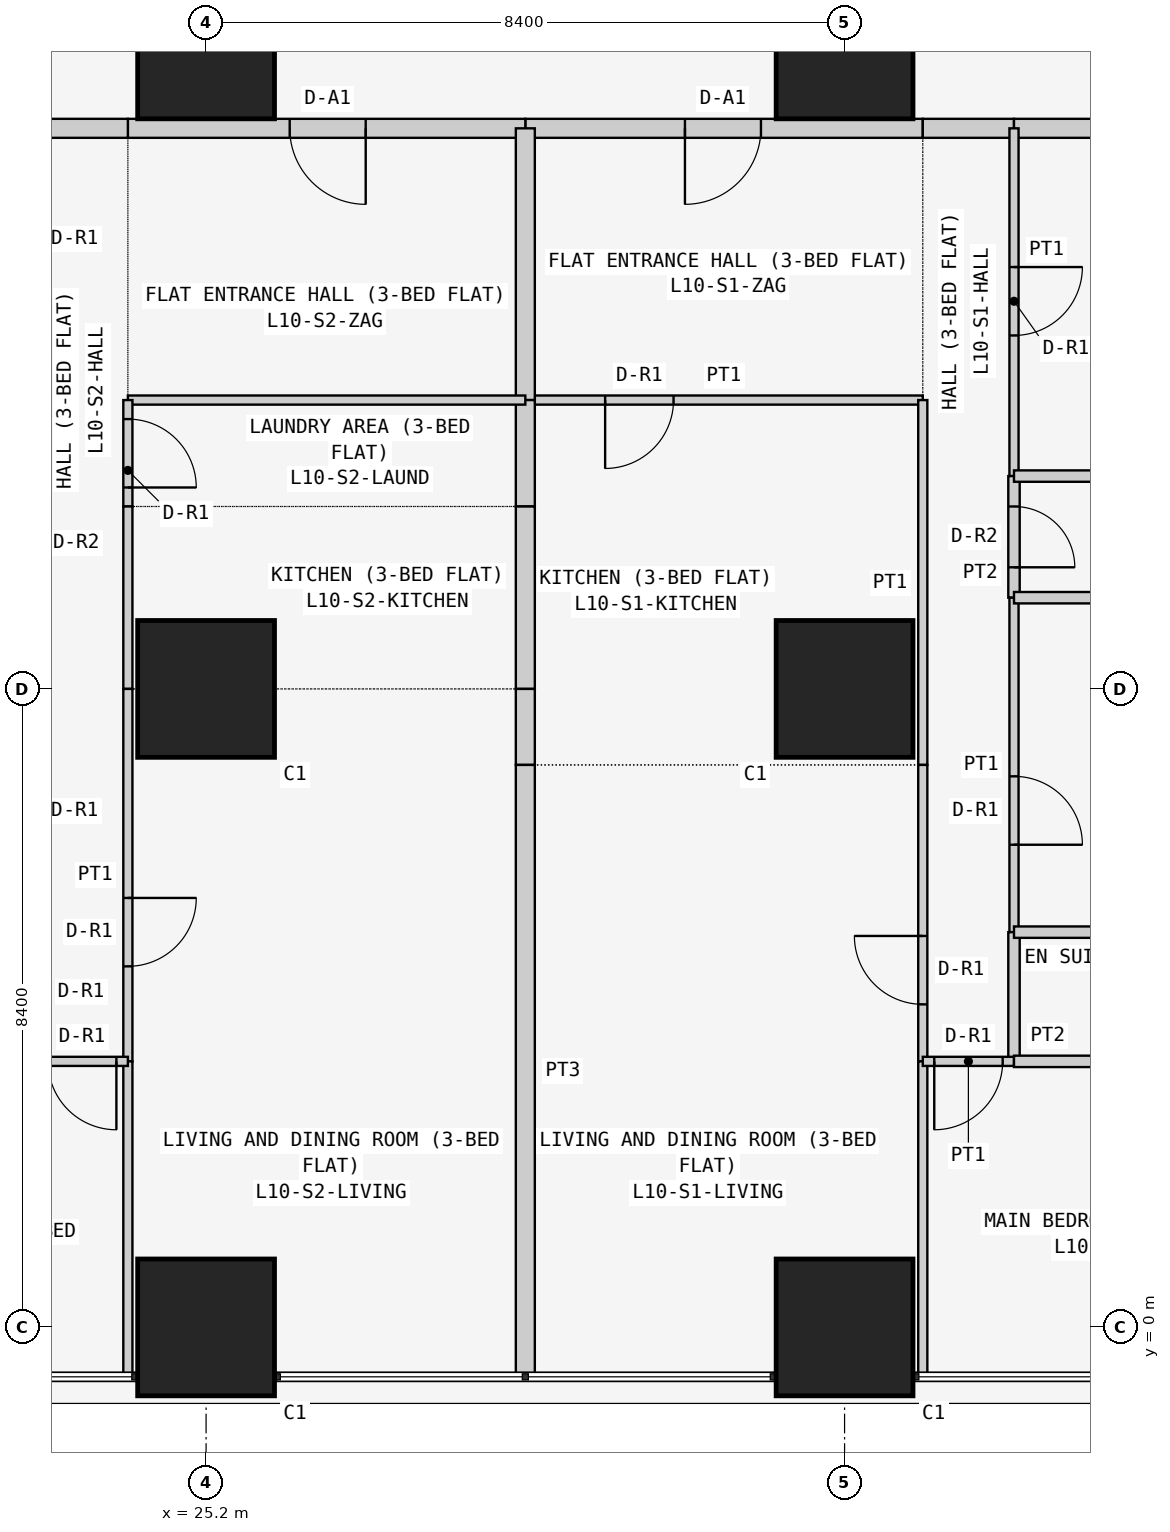
"""IFC4 building model, lengths in metres.
Left out: names, types, materials, properties, quantities, classifications, styles, units other than length and angle.
Written with IfcOpenShell. Run it as: python <this file> out.ifc"""

import sys

from ifc_helpers import new_model, si_unit, direction, frame, frame_2d, origin, origin_2d, place, context, subcontext, project, spatial, rectangle, extrude, element, fill, save


model = new_model("IFC4")
c1 = context("Model", 3, precision=1e-05, world=origin(), true_north=direction((0.0, 1.0)))
c2 = subcontext(c1, "Body", "Model", "MODEL_VIEW")
j1 = project(units=[si_unit("LENGTHUNIT", "METRE"), si_unit("PLANEANGLEUNIT", "RADIAN")], contexts=[c1])
p1 = place(None, origin())
s1 = spatial("IfcSite", under=j1, at=p1, CompositionType="ELEMENT")
p2 = place(p1, origin())
s2 = spatial("IfcBuilding", under=s1, at=p2, CompositionType="ELEMENT")
p3 = place(p2, frame((0.0, 0.0, 45.3)))
s3 = spatial("IfcBuildingStorey", under=s2, at=p3, CompositionType="ELEMENT", Elevation=45.3)
for number, where, z_axis, x_axis in (
    (1, (25.2, 0.0, 0.0), (0.0, 0.0, 1.0), (1.0, 0.0, 0.0)),
    (2, (25.2, 8.4, 0.0), (0.0, 0.0, 1.0), (1.0, 0.0, 0.0)),
    (3, (25.2, 16.8, 0.0), (0.0, 0.0, 1.0), (1.0, 0.0, 0.0)),
    (4, (33.6, 0.0, 0.0), (0.0, 0.0, 1.0), (1.0, 0.0, 0.0)),
    (5, (33.6, 8.4, 0.0), (0.0, 0.0, 1.0), (1.0, 0.0, 0.0)),
    (6, (33.6, 16.8, 0.0), (0.0, 0.0, 1.0), (1.0, 0.0, 0.0)),
):
    element("IfcColumn", number, at=place(p3, frame(where, z_axis=z_axis, x_axis=x_axis)), inside=s3, PredefinedType="COLUMN", context=c2, shape_type="SweptSolid", body=[
        extrude(rectangle(XDim=1.8, YDim=1.8, at=origin_2d()), origin(), (0.0, 0.0, 1.0), 3.6),
    ])
p4 = place(p3, frame((34.629, 15.775, 0.0), z_axis=(0.0, 0.0, 1.0), x_axis=(-1.0, 0.0, 0.0)))
e7 = element("IfcWall", 7, at=p4, inside=s3, PredefinedType="PARTITIONING", context=c2, shape_type="SweptSolid", body=[
    extrude(rectangle(XDim=5.229, YDim=0.25, at=frame_2d((2.615, 0.0))), origin(), (0.0, 0.0, 1.0), 3.45),
])
p5 = place(p4, frame((2.129, 0.0, 0.0)))
e8 = element("IfcOpeningElement", 8, at=p5, cuts=e7, PredefinedType="OPENING", context=c2, shape_type="SweptSolid", body=[
    extrude(rectangle(XDim=1.0, YDim=2.1, at=frame_2d((0.5, 1.05))), frame((0.0, 0.135, 0.0), z_axis=(0.0, -1.0, 0.0), x_axis=(1.0, 0.0, 0.0)), (0.0, 0.0, 1.0), 0.27),
])
p6 = place(p3, frame((35.829, 15.775, 0.0), z_axis=(0.0, 0.0, 1.0), x_axis=(-1.0, 0.0, 0.0)))
e9 = element("IfcWall", 9, at=p6, inside=s3, PredefinedType="PARTITIONING", context=c2, shape_type="SweptSolid", body=[
    extrude(rectangle(XDim=1.2, YDim=0.25, at=frame_2d((0.6, 0.0))), origin(), (0.0, 0.0, 1.0), 3.45),
])
p7 = place(p3, frame((42.7, 15.775, 0.0), z_axis=(0.0, 0.0, 1.0), x_axis=(-1.0, 0.0, 0.0)))
e10 = element("IfcWall", 10, at=p7, inside=s3, PredefinedType="PARTITIONING", context=c2, shape_type="SweptSolid", body=[
    extrude(rectangle(XDim=6.871, YDim=0.25, at=frame_2d((3.436, 0.0))), origin(), (0.0, 0.0, 1.0), 3.45),
])
p8 = place(p3, frame((29.4, 15.775, 0.0), z_axis=(0.0, 0.0, 1.0), x_axis=(-1.0, 0.0, 0.0)))
e11 = element("IfcWall", 11, at=p8, inside=s3, PredefinedType="PARTITIONING", context=c2, shape_type="SweptSolid", body=[
    extrude(rectangle(XDim=5.229, YDim=0.25, at=frame_2d((2.615, 0.0))), origin(), (0.0, 0.0, 1.0), 3.45),
])
p9 = place(p8, frame((2.1, 0.0, 0.0)))
e12 = element("IfcOpeningElement", 12, at=p9, cuts=e11, PredefinedType="OPENING", context=c2, shape_type="SweptSolid", body=[
    extrude(rectangle(XDim=1.0, YDim=2.1, at=frame_2d((0.5, 1.05))), frame((0.0, 0.135, 0.0), z_axis=(0.0, -1.0, 0.0), x_axis=(1.0, 0.0, 0.0)), (0.0, 0.0, 1.0), 0.27),
])
p10 = place(p3, frame((24.171, 15.775, 0.0), z_axis=(0.0, 0.0, 1.0), x_axis=(-1.0, 0.0, 0.0)))
e13 = element("IfcWall", 13, at=p10, inside=s3, PredefinedType="PARTITIONING", context=c2, shape_type="SweptSolid", body=[
    extrude(rectangle(XDim=1.2, YDim=0.25, at=frame_2d((0.6, 0.0))), origin(), (0.0, 0.0, 1.0), 3.45),
])
p11 = place(p3, frame((29.4, 12.2, 0.0), z_axis=(0.0, 0.0, 1.0), x_axis=(1.0, 0.0, 0.0)))
e14 = element("IfcWall", 14, at=p11, inside=s3, PredefinedType="PARTITIONING", context=c2, shape_type="SweptSolid", body=[
    extrude(rectangle(XDim=5.229, YDim=0.12, at=frame_2d((2.615, 0.0))), origin(), (0.0, 0.0, 1.0), 3.45),
])
p12 = place(p11, frame((1.05, 0.0, 0.0)))
e15 = element("IfcOpeningElement", 15, at=p12, cuts=e14, PredefinedType="OPENING", context=c2, shape_type="SweptSolid", body=[
    extrude(rectangle(XDim=0.9, YDim=2.1, at=frame_2d((0.45, 1.05))), frame((0.0, 0.07, 0.0), z_axis=(0.0, -1.0, 0.0), x_axis=(1.0, 0.0, 0.0)), (0.0, 0.0, 1.0), 0.14),
])
p13 = place(p3, frame((29.4, 15.775, 0.0), z_axis=(0.0, 0.0, 1.0), x_axis=(0.0, -1.0, 0.0)))
e16 = element("IfcWall", 16, at=p13, inside=s3, PredefinedType="PARTITIONING", context=c2, shape_type="SweptSolid", body=[
    extrude(rectangle(XDim=3.575, YDim=0.25, at=frame_2d((1.788, 0.0))), origin(), (0.0, 0.0, 1.0), 2.848),
])
p14 = place(p3, frame((34.629, 7.4, 0.0), z_axis=(0.0, 0.0, 1.0), x_axis=(0.0, 1.0, 0.0)))
e17 = element("IfcWall", 17, at=p14, inside=s3, PredefinedType="PARTITIONING", context=c2, shape_type="SweptSolid", body=[
    extrude(rectangle(XDim=4.8, YDim=0.12, at=frame_2d((2.4, 0.0))), origin(), (0.0, 0.0, 1.0), 3.45),
])
p15 = place(p3, frame((29.4, 12.2, 0.0), z_axis=(0.0, 0.0, 1.0), x_axis=(0.0, -1.0, 0.0)))
e18 = element("IfcWall", 18, at=p15, inside=s3, PredefinedType="PARTITIONING", context=c2, shape_type="SweptSolid", body=[
    extrude(rectangle(XDim=1.4, YDim=0.25, at=frame_2d((0.7, 0.0))), origin(), (0.0, 0.0, 1.0), 2.848),
])
p16 = place(p3, frame((29.4, 10.8, 0.0), z_axis=(0.0, 0.0, 1.0), x_axis=(0.0, -1.0, 0.0)))
e19 = element("IfcWall", 19, at=p16, inside=s3, PredefinedType="PARTITIONING", context=c2, shape_type="SweptSolid", body=[
    extrude(rectangle(XDim=2.4, YDim=0.25, at=frame_2d((1.2, 0.0))), origin(), (0.0, 0.0, 1.0), 2.848),
])
p17 = place(p3, frame((29.4, 8.4, 0.0), z_axis=(0.0, 0.0, 1.0), x_axis=(0.0, -1.0, 0.0)))
e20 = element("IfcWall", 20, at=p17, inside=s3, PredefinedType="PARTITIONING", context=c2, shape_type="SweptSolid", body=[
    extrude(rectangle(XDim=1.0, YDim=0.25, at=frame_2d((0.5, 0.0))), origin(), (0.0, 0.0, 1.0), 2.848),
])
p18 = place(p3, frame((34.629, 3.5, 0.0), z_axis=(0.0, 0.0, 1.0), x_axis=(0.0, 1.0, 0.0)))
e21 = element("IfcWall", 21, at=p18, inside=s3, PredefinedType="PARTITIONING", context=c2, shape_type="SweptSolid", body=[
    extrude(rectangle(XDim=3.9, YDim=0.12, at=frame_2d((1.95, 0.0))), origin(), (0.0, 0.0, 1.0), 3.45),
])
p19 = place(p18, frame((0.75, 0.0, 0.0)))
e22 = element("IfcOpeningElement", 22, at=p19, cuts=e21, PredefinedType="OPENING", context=c2, shape_type="SweptSolid", body=[
    extrude(rectangle(XDim=0.9, YDim=2.1, at=frame_2d((0.45, 1.05))), frame((0.0, 0.07, 0.0), z_axis=(0.0, -1.0, 0.0), x_axis=(1.0, 0.0, 0.0)), (0.0, 0.0, 1.0), 0.14),
])
p20 = place(p3, frame((34.629, -0.65, 0.0), z_axis=(0.0, 0.0, 1.0), x_axis=(0.0, 1.0, 0.0)))
e23 = element("IfcWall", 23, at=p20, inside=s3, PredefinedType="PARTITIONING", context=c2, shape_type="SweptSolid", body=[
    extrude(rectangle(XDim=4.15, YDim=0.12, at=frame_2d((2.075, 0.0))), origin(), (0.0, 0.0, 1.0), 3.45),
])
p21 = place(p3, frame((29.4, 7.4, 0.0), z_axis=(0.0, 0.0, 1.0), x_axis=(0.0, -1.0, 0.0)))
e24 = element("IfcWall", 24, at=p21, inside=s3, PredefinedType="PARTITIONING", context=c2, shape_type="SweptSolid", body=[
    extrude(rectangle(XDim=8.05, YDim=0.25, at=frame_2d((4.025, 0.0))), origin(), (0.0, 0.0, 1.0), 2.848),
])
p22 = place(p3, frame((35.829, 11.2, 0.0), z_axis=(0.0, 0.0, 1.0), x_axis=(0.0, 1.0, 0.0)))
e25 = element("IfcWall", 25, at=p22, inside=s3, PredefinedType="PARTITIONING", context=c2, shape_type="SweptSolid", body=[
    extrude(rectangle(XDim=4.575, YDim=0.12, at=frame_2d((2.288, 0.0))), origin(), (0.0, 0.0, 1.0), 3.45),
])
p23 = place(p22, frame((1.85, 0.0, 0.0)))
e26 = element("IfcOpeningElement", 26, at=p23, cuts=e25, PredefinedType="OPENING", context=c2, shape_type="SweptSolid", body=[
    extrude(rectangle(XDim=0.9, YDim=2.1, at=frame_2d((0.45, 1.05))), frame((0.0, 0.07, 0.0), z_axis=(0.0, -1.0, 0.0), x_axis=(1.0, 0.0, 0.0)), (0.0, 0.0, 1.0), 0.14),
])
p24 = place(p3, frame((35.829, 9.6, 0.0), z_axis=(0.0, 0.0, 1.0), x_axis=(0.0, 1.0, 0.0)))
e27 = element("IfcWall", 27, at=p24, inside=s3, PredefinedType="PARTITIONING", context=c2, shape_type="SweptSolid", body=[
    extrude(rectangle(XDim=1.6, YDim=0.15, at=frame_2d((0.8, 0.0))), origin(), (0.0, 0.0, 1.0), 3.45),
])
p25 = place(p24, frame((0.4, 0.0, 0.0)))
e28 = element("IfcOpeningElement", 28, at=p25, cuts=e27, PredefinedType="OPENING", context=c2, shape_type="SweptSolid", body=[
    extrude(rectangle(XDim=0.8, YDim=2.1, at=frame_2d((0.4, 1.05))), frame((0.0, 0.085, 0.0), z_axis=(0.0, -1.0, 0.0), x_axis=(1.0, 0.0, 0.0)), (0.0, 0.0, 1.0), 0.17),
])
p26 = place(p3, frame((35.829, 5.2, 0.0), z_axis=(0.0, 0.0, 1.0), x_axis=(0.0, 1.0, 0.0)))
e29 = element("IfcWall", 29, at=p26, inside=s3, PredefinedType="PARTITIONING", context=c2, shape_type="SweptSolid", body=[
    extrude(rectangle(XDim=4.4, YDim=0.12, at=frame_2d((2.2, 0.0))), origin(), (0.0, 0.0, 1.0), 3.45),
])
p27 = place(p26, frame((1.15, 0.0, 0.0)))
e30 = element("IfcOpeningElement", 30, at=p27, cuts=e29, PredefinedType="OPENING", context=c2, shape_type="SweptSolid", body=[
    extrude(rectangle(XDim=0.9, YDim=2.1, at=frame_2d((0.45, 1.05))), frame((0.0, 0.07, 0.0), z_axis=(0.0, -1.0, 0.0), x_axis=(1.0, 0.0, 0.0)), (0.0, 0.0, 1.0), 0.14),
])
p28 = place(p3, frame((35.829, 3.5, 0.0), z_axis=(0.0, 0.0, 1.0), x_axis=(0.0, 1.0, 0.0)))
e31 = element("IfcWall", 31, at=p28, inside=s3, PredefinedType="PARTITIONING", context=c2, shape_type="SweptSolid", body=[
    extrude(rectangle(XDim=1.7, YDim=0.15, at=frame_2d((0.85, 0.0))), origin(), (0.0, 0.0, 1.0), 3.45),
])
p29 = place(p3, frame((34.629, 3.5, 0.0), z_axis=(0.0, 0.0, 1.0), x_axis=(1.0, 0.0, 0.0)))
e32 = element("IfcWall", 32, at=p29, inside=s3, PredefinedType="PARTITIONING", context=c2, shape_type="SweptSolid", body=[
    extrude(rectangle(XDim=1.2, YDim=0.12, at=frame_2d((0.6, 0.0))), origin(), (0.0, 0.0, 1.0), 3.45),
])
p30 = place(p29, frame((0.151, 0.0, 0.0)))
e33 = element("IfcOpeningElement", 33, at=p30, cuts=e32, PredefinedType="OPENING", context=c2, shape_type="SweptSolid", body=[
    extrude(rectangle(XDim=0.9, YDim=2.1, at=frame_2d((0.45, 1.05))), frame((0.0, 0.07, 0.0), z_axis=(0.0, -1.0, 0.0), x_axis=(1.0, 0.0, 0.0)), (0.0, 0.0, 1.0), 0.14),
])
for number, where, z_axis, x_axis in (
    (34, (35.829, 11.2, 0.0), (0.0, 0.0, 1.0), (1.0, 0.0, 0.0)),
    (35, (35.829, 9.6, 0.0), (0.0, 0.0, 1.0), (1.0, 0.0, 0.0)),
    (36, (35.829, 5.2, 0.0), (0.0, 0.0, 1.0), (1.0, 0.0, 0.0)),
):
    element("IfcWall", number, at=place(p3, frame(where, z_axis=z_axis, x_axis=x_axis)), inside=s3, PredefinedType="PARTITIONING", context=c2, shape_type="SweptSolid", body=[
        extrude(rectangle(XDim=6.871, YDim=0.15, at=frame_2d((3.436, 0.0))), origin(), (0.0, 0.0, 1.0), 3.45),
    ])
p31 = place(p3, frame((35.829, 3.5, 0.0), z_axis=(0.0, 0.0, 1.0), x_axis=(1.0, 0.0, 0.0)))
e37 = element("IfcWall", 37, at=p31, inside=s3, PredefinedType="PARTITIONING", context=c2, shape_type="SweptSolid", body=[
    extrude(rectangle(XDim=6.871, YDim=0.15, at=frame_2d((3.436, 0.0))), origin(), (0.0, 0.0, 1.0), 3.45),
])
p32 = place(p31, frame((3.171, 0.0, 0.0)))
e38 = element("IfcOpeningElement", 38, at=p32, cuts=e37, PredefinedType="OPENING", context=c2, shape_type="SweptSolid", body=[
    extrude(rectangle(XDim=0.8, YDim=2.1, at=frame_2d((0.4, 1.05))), frame((0.0, 0.085, 0.0), z_axis=(0.0, -1.0, 0.0), x_axis=(1.0, 0.0, 0.0)), (0.0, 0.0, 1.0), 0.17),
])
p33 = place(p3, frame((29.4, 12.2, 0.0), z_axis=(0.0, 0.0, 1.0), x_axis=(-1.0, 0.0, 0.0)))
e39 = element("IfcWall", 39, at=p33, inside=s3, PredefinedType="PARTITIONING", context=c2, shape_type="SweptSolid", body=[
    extrude(rectangle(XDim=5.229, YDim=0.12, at=frame_2d((2.615, 0.0))), origin(), (0.0, 0.0, 1.0), 3.45),
])
p34 = place(p3, frame((24.171, 10.8, 0.0), z_axis=(0.0, 0.0, 1.0), x_axis=(0.0, 1.0, 0.0)))
e40 = element("IfcWall", 40, at=p34, inside=s3, PredefinedType="PARTITIONING", context=c2, shape_type="SweptSolid", body=[
    extrude(rectangle(XDim=1.4, YDim=0.12, at=frame_2d((0.7, 0.0))), origin(), (0.0, 0.0, 1.0), 3.45),
])
p35 = place(p34, frame((0.25, 0.0, 0.0)))
e41 = element("IfcOpeningElement", 41, at=p35, cuts=e40, PredefinedType="OPENING", context=c2, shape_type="SweptSolid", body=[
    extrude(rectangle(XDim=0.9, YDim=2.1, at=frame_2d((0.45, 1.05))), frame((0.0, 0.07, 0.0), z_axis=(0.0, -1.0, 0.0), x_axis=(1.0, 0.0, 0.0)), (0.0, 0.0, 1.0), 0.14),
])
p36 = place(p3, frame((24.171, 8.4, 0.0), z_axis=(0.0, 0.0, 1.0), x_axis=(0.0, 1.0, 0.0)))
e42 = element("IfcWall", 42, at=p36, inside=s3, PredefinedType="PARTITIONING", context=c2, shape_type="SweptSolid", body=[
    extrude(rectangle(XDim=2.4, YDim=0.12, at=frame_2d((1.2, 0.0))), origin(), (0.0, 0.0, 1.0), 3.45),
])
p37 = place(p3, frame((24.171, 3.5, 0.0), z_axis=(0.0, 0.0, 1.0), x_axis=(0.0, 1.0, 0.0)))
e43 = element("IfcWall", 43, at=p37, inside=s3, PredefinedType="PARTITIONING", context=c2, shape_type="SweptSolid", body=[
    extrude(rectangle(XDim=4.9, YDim=0.12, at=frame_2d((2.45, 0.0))), origin(), (0.0, 0.0, 1.0), 3.45),
])
p38 = place(p37, frame((1.25, 0.0, 0.0)))
e44 = element("IfcOpeningElement", 44, at=p38, cuts=e43, PredefinedType="OPENING", context=c2, shape_type="SweptSolid", body=[
    extrude(rectangle(XDim=0.9, YDim=2.1, at=frame_2d((0.45, 1.05))), frame((0.0, 0.07, 0.0), z_axis=(0.0, -1.0, 0.0), x_axis=(1.0, 0.0, 0.0)), (0.0, 0.0, 1.0), 0.14),
])
p39 = place(p3, frame((24.171, -0.65, 0.0), z_axis=(0.0, 0.0, 1.0), x_axis=(0.0, 1.0, 0.0)))
e45 = element("IfcWall", 45, at=p39, inside=s3, PredefinedType="PARTITIONING", context=c2, shape_type="SweptSolid", body=[
    extrude(rectangle(XDim=4.15, YDim=0.12, at=frame_2d((2.075, 0.0))), origin(), (0.0, 0.0, 1.0), 3.45),
])
p40 = place(p3, frame((24.171, 3.5, 0.0), z_axis=(0.0, 0.0, 1.0), x_axis=(-1.0, 0.0, 0.0)))
e46 = element("IfcWall", 46, at=p40, inside=s3, PredefinedType="PARTITIONING", context=c2, shape_type="SweptSolid", body=[
    extrude(rectangle(XDim=1.2, YDim=0.12, at=frame_2d((0.6, 0.0))), origin(), (0.0, 0.0, 1.0), 3.45),
])
p41 = place(p40, frame((0.151, 0.0, 0.0)))
e47 = element("IfcOpeningElement", 47, at=p41, cuts=e46, PredefinedType="OPENING", context=c2, shape_type="SweptSolid", body=[
    extrude(rectangle(XDim=0.9, YDim=2.1, at=frame_2d((0.45, 1.05))), frame((0.0, 0.07, 0.0), z_axis=(0.0, -1.0, 0.0), x_axis=(1.0, 0.0, 0.0)), (0.0, 0.0, 1.0), 0.14),
])
p42 = place(p5, origin())
e48 = element("IfcDoor", 48, at=p42, inside=s3, OperationType="SINGLE_SWING_RIGHT", PredefinedType="DOOR", context=c2, shape_type="SweptSolid", body=[
    extrude(rectangle(XDim=1.0, YDim=2.1, at=frame_2d((0.5, 1.05))), frame((0.0, 0.025, 0.0), z_axis=(0.0, -1.0, 0.0), x_axis=(1.0, 0.0, 0.0)), (0.0, 0.0, 1.0), 0.05),
])
fill(e8, e48)
p43 = place(p12, frame((0.9, 0.0, 0.0), z_axis=(0.0, 0.0, 1.0), x_axis=(-1.0, 0.0, 0.0)))
e49 = element("IfcDoor", 49, at=p43, inside=s3, OperationType="SINGLE_SWING_RIGHT", PredefinedType="DOOR", context=c2, shape_type="SweptSolid", body=[
    extrude(rectangle(XDim=0.9, YDim=2.1, at=frame_2d((0.45, 1.05))), frame((0.0, 0.025, 0.0), z_axis=(0.0, -1.0, 0.0), x_axis=(1.0, 0.0, 0.0)), (0.0, 0.0, 1.0), 0.05),
])
fill(e15, e49)
p44 = place(p19, origin())
e50 = element("IfcDoor", 50, at=p44, inside=s3, OperationType="SINGLE_SWING_RIGHT", PredefinedType="DOOR", context=c2, shape_type="SweptSolid", body=[
    extrude(rectangle(XDim=0.9, YDim=2.1, at=frame_2d((0.45, 1.05))), frame((0.0, 0.025, 0.0), z_axis=(0.0, -1.0, 0.0), x_axis=(1.0, 0.0, 0.0)), (0.0, 0.0, 1.0), 0.05),
])
fill(e22, e50)
p45 = place(p23, frame((0.9, 0.0, 0.0), z_axis=(0.0, 0.0, 1.0), x_axis=(-1.0, 0.0, 0.0)))
e51 = element("IfcDoor", 51, at=p45, inside=s3, OperationType="SINGLE_SWING_LEFT", PredefinedType="DOOR", context=c2, shape_type="SweptSolid", body=[
    extrude(rectangle(XDim=0.9, YDim=2.1, at=frame_2d((0.45, 1.05))), frame((0.0, 0.025, 0.0), z_axis=(0.0, -1.0, 0.0), x_axis=(1.0, 0.0, 0.0)), (0.0, 0.0, 1.0), 0.05),
])
fill(e26, e51)
p46 = place(p25, frame((0.8, 0.0, 0.0), z_axis=(0.0, 0.0, 1.0), x_axis=(-1.0, 0.0, 0.0)))
e52 = element("IfcDoor", 52, at=p46, inside=s3, OperationType="SINGLE_SWING_RIGHT", PredefinedType="DOOR", context=c2, shape_type="SweptSolid", body=[
    extrude(rectangle(XDim=0.8, YDim=2.1, at=frame_2d((0.4, 1.05))), frame((0.0, 0.025, 0.0), z_axis=(0.0, -1.0, 0.0), x_axis=(1.0, 0.0, 0.0)), (0.0, 0.0, 1.0), 0.05),
])
fill(e28, e52)
p47 = place(p27, frame((0.9, 0.0, 0.0), z_axis=(0.0, 0.0, 1.0), x_axis=(-1.0, 0.0, 0.0)))
e53 = element("IfcDoor", 53, at=p47, inside=s3, OperationType="SINGLE_SWING_RIGHT", PredefinedType="DOOR", context=c2, shape_type="SweptSolid", body=[
    extrude(rectangle(XDim=0.9, YDim=2.1, at=frame_2d((0.45, 1.05))), frame((0.0, 0.025, 0.0), z_axis=(0.0, -1.0, 0.0), x_axis=(1.0, 0.0, 0.0)), (0.0, 0.0, 1.0), 0.05),
])
fill(e30, e53)
p48 = place(p30, frame((0.9, 0.0, 0.0), z_axis=(0.0, 0.0, 1.0), x_axis=(-1.0, 0.0, 0.0)))
e54 = element("IfcDoor", 54, at=p48, inside=s3, OperationType="SINGLE_SWING_RIGHT", PredefinedType="DOOR", context=c2, shape_type="SweptSolid", body=[
    extrude(rectangle(XDim=0.9, YDim=2.1, at=frame_2d((0.45, 1.05))), frame((0.0, 0.025, 0.0), z_axis=(0.0, -1.0, 0.0), x_axis=(1.0, 0.0, 0.0)), (0.0, 0.0, 1.0), 0.05),
])
fill(e33, e54)
p49 = place(p9, origin())
e55 = element("IfcDoor", 55, at=p49, inside=s3, OperationType="SINGLE_SWING_LEFT", PredefinedType="DOOR", context=c2, shape_type="SweptSolid", body=[
    extrude(rectangle(XDim=1.0, YDim=2.1, at=frame_2d((0.5, 1.05))), frame((0.0, 0.025, 0.0), z_axis=(0.0, -1.0, 0.0), x_axis=(1.0, 0.0, 0.0)), (0.0, 0.0, 1.0), 0.05),
])
fill(e12, e55)
p50 = place(p35, frame((0.9, 0.0, 0.0), z_axis=(0.0, 0.0, 1.0), x_axis=(-1.0, 0.0, 0.0)))
e56 = element("IfcDoor", 56, at=p50, inside=s3, OperationType="SINGLE_SWING_RIGHT", PredefinedType="DOOR", context=c2, shape_type="SweptSolid", body=[
    extrude(rectangle(XDim=0.9, YDim=2.1, at=frame_2d((0.45, 1.05))), frame((0.0, 0.025, 0.0), z_axis=(0.0, -1.0, 0.0), x_axis=(1.0, 0.0, 0.0)), (0.0, 0.0, 1.0), 0.05),
])
fill(e41, e56)
p51 = place(p38, frame((0.9, 0.0, 0.0), z_axis=(0.0, 0.0, 1.0), x_axis=(-1.0, 0.0, 0.0)))
e57 = element("IfcDoor", 57, at=p51, inside=s3, OperationType="SINGLE_SWING_LEFT", PredefinedType="DOOR", context=c2, shape_type="SweptSolid", body=[
    extrude(rectangle(XDim=0.9, YDim=2.1, at=frame_2d((0.45, 1.05))), frame((0.0, 0.025, 0.0), z_axis=(0.0, -1.0, 0.0), x_axis=(1.0, 0.0, 0.0)), (0.0, 0.0, 1.0), 0.05),
])
fill(e44, e57)
p52 = place(p41, origin())
e58 = element("IfcDoor", 58, at=p52, inside=s3, OperationType="SINGLE_SWING_LEFT", PredefinedType="DOOR", context=c2, shape_type="SweptSolid", body=[
    extrude(rectangle(XDim=0.9, YDim=2.1, at=frame_2d((0.45, 1.05))), frame((0.0, 0.025, 0.0), z_axis=(0.0, -1.0, 0.0), x_axis=(1.0, 0.0, 0.0)), (0.0, 0.0, 1.0), 0.05),
])
fill(e47, e58)
save(model, sys.argv[1])
